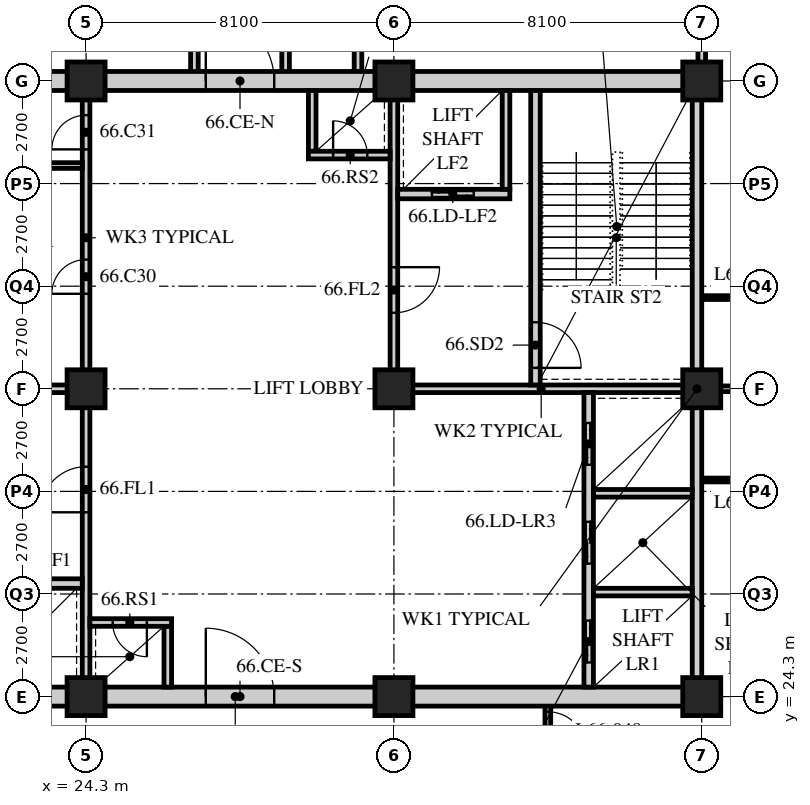
"""IFC4 building model, lengths in metres.
Left out: names, types, materials, properties, quantities, classifications, styles, units other than length and angle.
Written with IfcOpenShell. Run it as: python <this file> out.ifc"""

import sys

from ifc_helpers import new_model, si_unit, direction, frame, frame_2d, origin, origin_2d, place, context, subcontext, project, spatial, rectangle, hollow_rectangle, extrude, element, fill, save


model = new_model("IFC4")
c1 = context("Model", 3, precision=1e-05, world=origin(), true_north=direction((0.0, 1.0)))
c2 = subcontext(c1, "Body", "Model", "MODEL_VIEW")
j1 = project(units=[si_unit("LENGTHUNIT", "METRE"), si_unit("PLANEANGLEUNIT", "RADIAN")], contexts=[c1])
p1 = place(None, origin())
s1 = spatial("IfcSite", under=j1, at=p1, CompositionType="ELEMENT")
p2 = place(p1, origin())
s2 = spatial("IfcBuilding", under=s1, at=p2, CompositionType="ELEMENT")
p3 = place(p2, frame((0.0, 0.0, 258.0)))
s3 = spatial("IfcBuildingStorey", under=s2, at=p3, CompositionType="ELEMENT", Elevation=258.0)
for number, where, z_axis, x_axis in (
    (1, (24.3, 24.3, 0.0), (0.0, 0.0, 1.0), (1.0, 0.0, 0.0)),
    (2, (24.3, 32.4, 0.0), (0.0, 0.0, 1.0), (1.0, 0.0, 0.0)),
    (3, (24.3, 40.5, 0.0), (0.0, 0.0, 1.0), (1.0, 0.0, 0.0)),
    (4, (32.4, 24.3, 0.0), (0.0, 0.0, 1.0), (1.0, 0.0, 0.0)),
    (5, (32.4, 32.4, 0.0), (0.0, 0.0, 1.0), (1.0, 0.0, 0.0)),
    (6, (32.4, 40.5, 0.0), (0.0, 0.0, 1.0), (1.0, 0.0, 0.0)),
    (7, (40.5, 24.3, 0.0), (0.0, 0.0, 1.0), (1.0, 0.0, 0.0)),
    (8, (40.5, 32.4, 0.0), (0.0, 0.0, 1.0), (1.0, 0.0, 0.0)),
    (9, (40.5, 40.5, 0.0), (0.0, 0.0, 1.0), (1.0, 0.0, 0.0)),
):
    element("IfcColumn", number, at=place(p3, frame(where, z_axis=z_axis, x_axis=x_axis)), inside=s3, PredefinedType="COLUMN", context=c2, shape_type="SweptSolid", body=[
        extrude(hollow_rectangle(XDim=1.0, YDim=1.0, WallThickness=0.1, at=origin_2d()), origin(), (0.0, 0.0, 1.0), 3.9),
    ])
for number, where, z_axis, x_axis in (
    (10, (31.455, 46.8, 0.0), (0.0, 0.0, 1.0), (0.0, -1.0, 0.0)),
    (11, (27.15, 40.5, 0.0), (0.0, 0.0, 1.0), (0.0, 1.0, 0.0)),
    (12, (29.55, 40.5, 0.0), (0.0, 0.0, 1.0), (0.0, 1.0, 0.0)),
):
    element("IfcWall", number, at=place(p3, frame(where, z_axis=z_axis, x_axis=x_axis)), inside=s3, PredefinedType="SOLIDWALL", context=c2, shape_type="SweptSolid", body=[
        extrude(rectangle(XDim=6.3, YDim=0.2, at=frame_2d((3.15, 0.0))), origin(), (0.0, 0.0, 1.0), 3.69),
    ])
p4 = place(p3, frame((36.45, 22.5, 0.0), z_axis=(0.0, 0.0, 1.0), x_axis=(0.0, 1.0, 0.0)))
e13 = element("IfcWall", 13, at=p4, inside=s3, PredefinedType="PARTITIONING", context=c2, shape_type="SweptSolid", body=[
    extrude(rectangle(XDim=1.8, YDim=0.15, at=frame_2d((0.9, 0.0))), origin(), (0.0, 0.0, 1.0), 3.69),
])
p5 = place(p4, frame((0.4, 0.0, 0.0)))
e14 = element("IfcOpeningElement", 14, at=p5, cuts=e13, PredefinedType="OPENING", context=c2, shape_type="SweptSolid", body=[
    extrude(rectangle(XDim=1.0, YDim=2.1, at=frame_2d((0.5, 1.05))), frame((0.0, 0.085, 0.0), z_axis=(0.0, -1.0, 0.0), x_axis=(1.0, 0.0, 0.0)), (0.0, 0.0, 1.0), 0.17),
])
p6 = place(p3, frame((40.5, 40.5, 0.0), z_axis=(0.0, 0.0, 1.0), x_axis=(0.0, 1.0, 0.0)))
e15 = element("IfcWall", 15, at=p6, inside=s3, PredefinedType="SOLIDWALL", context=c2, shape_type="SweptSolid", body=[
    extrude(rectangle(XDim=6.3, YDim=0.2, at=frame_2d((3.15, 0.0))), origin(), (0.0, 0.0, 1.0), 3.078),
])
p7 = place(p3, frame((40.5, 30.0, 0.0), z_axis=(0.0, 0.0, 1.0), x_axis=(1.0, 0.0, 0.0)))
e16 = element("IfcWall", 16, at=p7, inside=s3, PredefinedType="PARTITIONING", context=c2, shape_type="SweptSolid", body=[
    extrude(rectangle(XDim=2.4, YDim=0.1, at=frame_2d((1.2, 0.0))), origin(), (0.0, 0.0, 1.0), 3.69),
])
p8 = place(p7, frame((0.8, 0.0, 0.0)))
e17 = element("IfcOpeningElement", 17, at=p8, cuts=e16, PredefinedType="OPENING", context=c2, shape_type="SweptSolid", body=[
    extrude(rectangle(XDim=0.8, YDim=2.1, at=frame_2d((0.4, 1.05))), frame((0.0, 0.06, 0.0), z_axis=(0.0, -1.0, 0.0), x_axis=(1.0, 0.0, 0.0)), (0.0, 0.0, 1.0), 0.12),
])
p9 = place(p3, frame((40.5, 32.4, 0.0), z_axis=(0.0, 0.0, 1.0), x_axis=(1.0, 0.0, 0.0)))
e18 = element("IfcWall", 18, at=p9, inside=s3, PredefinedType="PARTITIONING", context=c2, shape_type="SweptSolid", body=[
    extrude(rectangle(XDim=15.9, YDim=0.15, at=frame_2d((7.95, 0.0))), origin(), (0.0, 0.0, 1.0), 3.078),
])
p10 = place(p3, frame((40.5, 34.8, 0.0), z_axis=(0.0, 0.0, 1.0), x_axis=(1.0, 0.0, 0.0)))
e19 = element("IfcWall", 19, at=p10, inside=s3, PredefinedType="PARTITIONING", context=c2, shape_type="SweptSolid", body=[
    extrude(rectangle(XDim=2.4, YDim=0.1, at=frame_2d((1.2, 0.0))), origin(), (0.0, 0.0, 1.0), 3.69),
])
p11 = place(p10, frame((0.8, 0.0, 0.0)))
e20 = element("IfcOpeningElement", 20, at=p11, cuts=e19, PredefinedType="OPENING", context=c2, shape_type="SweptSolid", body=[
    extrude(rectangle(XDim=0.8, YDim=2.1, at=frame_2d((0.4, 1.05))), frame((0.0, 0.06, 0.0), z_axis=(0.0, -1.0, 0.0), x_axis=(1.0, 0.0, 0.0)), (0.0, 0.0, 1.0), 0.12),
])
p12 = place(p3, frame((15.95, 24.3, 0.0), z_axis=(0.0, 0.0, 1.0), x_axis=(1.0, 0.0, 0.0)))
e21 = element("IfcWall", 21, at=p12, inside=s3, PredefinedType="SOLIDWALL", context=c2, shape_type="SweptSolid", body=[
    extrude(rectangle(XDim=24.55, YDim=0.5, at=frame_2d((12.275, 0.0))), origin(), (0.0, 0.0, 1.0), 3.04),
])
p13 = place(p12, frame((11.5, 0.0, 0.0)))
e22 = element("IfcOpeningElement", 22, at=p13, cuts=e21, PredefinedType="OPENING", context=c2, shape_type="SweptSolid", body=[
    extrude(rectangle(XDim=1.8, YDim=2.4, at=frame_2d((0.9, 1.2))), frame((0.0, 0.26, 0.0), z_axis=(0.0, -1.0, 0.0), x_axis=(1.0, 0.0, 0.0)), (0.0, 0.0, 1.0), 0.52),
])
p14 = place(p3, frame((15.95, 40.5, 0.0), z_axis=(0.0, 0.0, 1.0), x_axis=(1.0, 0.0, 0.0)))
e23 = element("IfcWall", 23, at=p14, inside=s3, PredefinedType="SOLIDWALL", context=c2, shape_type="SweptSolid", body=[
    extrude(rectangle(XDim=24.55, YDim=0.5, at=frame_2d((12.275, 0.0))), origin(), (0.0, 0.0, 1.0), 3.04),
])
p15 = place(p14, frame((11.5, 0.0, 0.0)))
e24 = element("IfcOpeningElement", 24, at=p15, cuts=e23, PredefinedType="OPENING", context=c2, shape_type="SweptSolid", body=[
    extrude(rectangle(XDim=1.8, YDim=2.4, at=frame_2d((0.9, 1.2))), frame((0.0, 0.26, 0.0), z_axis=(0.0, -1.0, 0.0), x_axis=(1.0, 0.0, 0.0)), (0.0, 0.0, 1.0), 0.52),
])
p16 = place(p3, frame((40.375, 24.55, 0.0), z_axis=(0.0, 0.0, 1.0), x_axis=(0.0, 1.0, 0.0)))
e25 = element("IfcWall", 25, at=p16, inside=s3, PredefinedType="SOLIDWALL", context=c2, shape_type="SweptSolid", body=[
    extrude(rectangle(XDim=15.7, YDim=0.25, at=frame_2d((7.85, 0.0))), origin(), (0.0, 0.0, 1.0), 3.078),
])
p17 = place(p3, frame((16.45, 32.4, 0.0), z_axis=(0.0, 0.0, 1.0), x_axis=(1.0, 0.0, 0.0)))
e26 = element("IfcWall", 26, at=p17, inside=s3, PredefinedType="SOLIDWALL", context=c2, shape_type="SweptSolid", body=[
    extrude(rectangle(XDim=7.95, YDim=0.2, at=frame_2d((3.975, 0.0))), origin(), (0.0, 0.0, 1.0), 3.078),
])
p18 = place(p3, frame((24.3, 24.55, 0.0), z_axis=(0.0, 0.0, 1.0), x_axis=(0.0, 1.0, 0.0)))
e27 = element("IfcWall", 27, at=p18, inside=s3, PredefinedType="SOLIDWALL", context=c2, shape_type="SweptSolid", body=[
    extrude(rectangle(XDim=7.75, YDim=0.2, at=frame_2d((3.875, 0.0))), origin(), (0.0, 0.0, 1.0), 3.078),
])
p19 = place(p18, frame((4.6, 0.0, 0.0)))
e28 = element("IfcOpeningElement", 28, at=p19, cuts=e27, PredefinedType="OPENING", context=c2, shape_type="SweptSolid", body=[
    extrude(rectangle(XDim=1.2, YDim=2.1, at=frame_2d((0.6, 1.05))), frame((0.0, 0.11, 0.0), z_axis=(0.0, -1.0, 0.0), x_axis=(1.0, 0.0, 0.0)), (0.0, 0.0, 1.0), 0.22),
])
p20 = place(p3, frame((21.25, 27.275, 0.0), z_axis=(0.0, 0.0, 1.0), x_axis=(1.0, 0.0, 0.0)))
e29 = element("IfcWall", 29, at=p20, inside=s3, PredefinedType="SOLIDWALL", context=c2, shape_type="SweptSolid", body=[
    extrude(rectangle(XDim=2.95, YDim=0.25, at=frame_2d((1.475, 0.0))), origin(), (0.0, 0.0, 1.0), 3.69),
])
p21 = place(p20, frame((0.95, 0.0, 0.0)))
e30 = element("IfcOpeningElement", 30, at=p21, cuts=e29, PredefinedType="OPENING", context=c2, shape_type="SweptSolid", body=[
    extrude(rectangle(XDim=1.1, YDim=2.4, at=frame_2d((0.55, 1.2))), frame((0.0, 0.135, 0.0), z_axis=(0.0, -1.0, 0.0), x_axis=(1.0, 0.0, 0.0)), (0.0, 0.0, 1.0), 0.27),
])
p22 = place(p3, frame((26.45, 24.55, 0.0), z_axis=(0.0, 0.0, 1.0), x_axis=(0.0, 1.0, 0.0)))
e31 = element("IfcWall", 31, at=p22, inside=s3, PredefinedType="SOLIDWALL", context=c2, shape_type="SweptSolid", body=[
    extrude(rectangle(XDim=1.6, YDim=0.2, at=frame_2d((0.8, 0.0))), origin(), (0.0, 0.0, 1.0), 3.69),
])
p23 = place(p3, frame((24.4, 26.25, 0.0), z_axis=(0.0, 0.0, 1.0), x_axis=(1.0, 0.0, 0.0)))
e32 = element("IfcWall", 32, at=p23, inside=s3, PredefinedType="SOLIDWALL", context=c2, shape_type="SweptSolid", body=[
    extrude(rectangle(XDim=2.15, YDim=0.2, at=frame_2d((1.075, 0.0))), origin(), (0.0, 0.0, 1.0), 3.69),
])
p24 = place(p23, frame((0.6, 0.0, 0.0)))
e33 = element("IfcOpeningElement", 33, at=p24, cuts=e32, PredefinedType="OPENING", context=c2, shape_type="SweptSolid", body=[
    extrude(rectangle(XDim=0.9, YDim=2.1, at=frame_2d((0.45, 1.05))), frame((0.0, 0.11, 0.0), z_axis=(0.0, -1.0, 0.0), x_axis=(1.0, 0.0, 0.0)), (0.0, 0.0, 1.0), 0.22),
])
p25 = place(p3, frame((32.3, 32.4, 0.0), z_axis=(0.0, 0.0, 1.0), x_axis=(1.0, 0.0, 0.0)))
e34 = element("IfcWall", 34, at=p25, inside=s3, PredefinedType="SOLIDWALL", context=c2, shape_type="SweptSolid", body=[
    extrude(rectangle(XDim=7.95, YDim=0.2, at=frame_2d((3.975, 0.0))), origin(), (0.0, 0.0, 1.0), 3.078),
])
p26 = place(p3, frame((32.4, 32.5, 0.0), z_axis=(0.0, 0.0, 1.0), x_axis=(0.0, 1.0, 0.0)))
e35 = element("IfcWall", 35, at=p26, inside=s3, PredefinedType="SOLIDWALL", context=c2, shape_type="SweptSolid", body=[
    extrude(rectangle(XDim=7.75, YDim=0.2, at=frame_2d((3.875, 0.0))), origin(), (0.0, 0.0, 1.0), 3.078),
])
p27 = place(p26, frame((1.9, 0.0, 0.0)))
e36 = element("IfcOpeningElement", 36, at=p27, cuts=e35, PredefinedType="OPENING", context=c2, shape_type="SweptSolid", body=[
    extrude(rectangle(XDim=1.2, YDim=2.1, at=frame_2d((0.6, 1.05))), frame((0.0, 0.11, 0.0), z_axis=(0.0, -1.0, 0.0), x_axis=(1.0, 0.0, 0.0)), (0.0, 0.0, 1.0), 0.22),
])
p28 = place(p3, frame((37.525, 24.55, 0.0), z_axis=(0.0, 0.0, 1.0), x_axis=(0.0, 1.0, 0.0)))
e37 = element("IfcWall", 37, at=p28, inside=s3, PredefinedType="SOLIDWALL", context=c2, shape_type="SweptSolid", body=[
    extrude(rectangle(XDim=7.75, YDim=0.25, at=frame_2d((3.875, 0.0))), origin(), (0.0, 0.0, 1.0), 3.69),
])
p29 = place(p28, frame((0.65, 0.0, 0.0)))
e38 = element("IfcOpeningElement", 38, at=p29, cuts=e37, PredefinedType="OPENING", context=c2, shape_type="SweptSolid", body=[
    extrude(rectangle(XDim=1.1, YDim=2.4, at=frame_2d((0.55, 1.2))), frame((0.0, 0.135, 0.0), z_axis=(0.0, -1.0, 0.0), x_axis=(1.0, 0.0, 0.0)), (0.0, 0.0, 1.0), 0.27),
])
p30 = place(p28, frame((3.25, 0.0, 0.0)))
e39 = element("IfcOpeningElement", 39, at=p30, cuts=e37, PredefinedType="OPENING", context=c2, shape_type="SweptSolid", body=[
    extrude(rectangle(XDim=1.1, YDim=2.4, at=frame_2d((0.55, 1.2))), frame((0.0, 0.135, 0.0), z_axis=(0.0, -1.0, 0.0), x_axis=(1.0, 0.0, 0.0)), (0.0, 0.0, 1.0), 0.27),
])
p31 = place(p28, frame((5.85, 0.0, 0.0)))
e40 = element("IfcOpeningElement", 40, at=p31, cuts=e37, PredefinedType="OPENING", context=c2, shape_type="SweptSolid", body=[
    extrude(rectangle(XDim=1.1, YDim=2.4, at=frame_2d((0.55, 1.2))), frame((0.0, 0.135, 0.0), z_axis=(0.0, -1.0, 0.0), x_axis=(1.0, 0.0, 0.0)), (0.0, 0.0, 1.0), 0.27),
])
for number, where, z_axis, x_axis in (
    (41, (37.65, 27.05, 0.0), (0.0, 0.0, 1.0), (1.0, 0.0, 0.0)),
    (42, (37.65, 29.65, 0.0), (0.0, 0.0, 1.0), (1.0, 0.0, 0.0)),
):
    element("IfcWall", number, at=place(p3, frame(where, z_axis=z_axis, x_axis=x_axis)), inside=s3, PredefinedType="SOLIDWALL", context=c2, shape_type="SweptSolid", body=[
        extrude(rectangle(XDim=2.6, YDim=0.2, at=frame_2d((1.3, 0.0))), origin(), (0.0, 0.0, 1.0), 3.69),
    ])
p32 = place(p3, frame((36.125, 32.5, 0.0), z_axis=(0.0, 0.0, 1.0), x_axis=(0.0, 1.0, 0.0)))
e43 = element("IfcWall", 43, at=p32, inside=s3, PredefinedType="SOLIDWALL", context=c2, shape_type="SweptSolid", body=[
    extrude(rectangle(XDim=7.75, YDim=0.25, at=frame_2d((3.875, 0.0))), origin(), (0.0, 0.0, 1.0), 3.69),
])
p33 = place(p32, frame((0.45, 0.0, 0.0)))
e44 = element("IfcOpeningElement", 44, at=p33, cuts=e43, PredefinedType="OPENING", context=c2, shape_type="SweptSolid", body=[
    extrude(rectangle(XDim=1.2, YDim=2.1, at=frame_2d((0.6, 1.05))), frame((0.0, 0.135, 0.0), z_axis=(0.0, -1.0, 0.0), x_axis=(1.0, 0.0, 0.0)), (0.0, 0.0, 1.0), 0.27),
])
p34 = place(p3, frame((32.5, 37.525, 0.0), z_axis=(0.0, 0.0, 1.0), x_axis=(1.0, 0.0, 0.0)))
e45 = element("IfcWall", 45, at=p34, inside=s3, PredefinedType="SOLIDWALL", context=c2, shape_type="SweptSolid", body=[
    extrude(rectangle(XDim=2.95, YDim=0.25, at=frame_2d((1.475, 0.0))), origin(), (0.0, 0.0, 1.0), 3.69),
])
p35 = place(p34, frame((0.9, 0.0, 0.0)))
e46 = element("IfcOpeningElement", 46, at=p35, cuts=e45, PredefinedType="OPENING", context=c2, shape_type="SweptSolid", body=[
    extrude(rectangle(XDim=1.1, YDim=2.4, at=frame_2d((0.55, 1.2))), frame((0.0, 0.135, 0.0), z_axis=(0.0, -1.0, 0.0), x_axis=(1.0, 0.0, 0.0)), (0.0, 0.0, 1.0), 0.27),
])
p36 = place(p3, frame((35.35, 37.65, 0.0), z_axis=(0.0, 0.0, 1.0), x_axis=(0.0, 1.0, 0.0)))
e47 = element("IfcWall", 47, at=p36, inside=s3, PredefinedType="SOLIDWALL", context=c2, shape_type="SweptSolid", body=[
    extrude(rectangle(XDim=2.6, YDim=0.2, at=frame_2d((1.3, 0.0))), origin(), (0.0, 0.0, 1.0), 3.69),
])
p37 = place(p3, frame((30.25, 38.65, 0.0), z_axis=(0.0, 0.0, 1.0), x_axis=(0.0, 1.0, 0.0)))
e48 = element("IfcWall", 48, at=p37, inside=s3, PredefinedType="SOLIDWALL", context=c2, shape_type="SweptSolid", body=[
    extrude(rectangle(XDim=1.6, YDim=0.2, at=frame_2d((0.8, 0.0))), origin(), (0.0, 0.0, 1.0), 3.69),
])
p38 = place(p3, frame((30.15, 38.55, 0.0), z_axis=(0.0, 0.0, 1.0), x_axis=(1.0, 0.0, 0.0)))
e49 = element("IfcWall", 49, at=p38, inside=s3, PredefinedType="SOLIDWALL", context=c2, shape_type="SweptSolid", body=[
    extrude(rectangle(XDim=2.15, YDim=0.2, at=frame_2d((1.075, 0.0))), origin(), (0.0, 0.0, 1.0), 3.69),
])
p39 = place(p38, frame((0.65, 0.0, 0.0)))
e50 = element("IfcOpeningElement", 50, at=p39, cuts=e49, PredefinedType="OPENING", context=c2, shape_type="SweptSolid", body=[
    extrude(rectangle(XDim=0.9, YDim=2.1, at=frame_2d((0.45, 1.05))), frame((0.0, 0.11, 0.0), z_axis=(0.0, -1.0, 0.0), x_axis=(1.0, 0.0, 0.0)), (0.0, 0.0, 1.0), 0.22),
])
p40 = place(p3, frame((24.3, 32.5, 0.0), z_axis=(0.0, 0.0, 1.0), x_axis=(0.0, 1.0, 0.0)))
e51 = element("IfcWall", 51, at=p40, inside=s3, PredefinedType="PARTITIONING", context=c2, shape_type="SweptSolid", body=[
    extrude(rectangle(XDim=7.75, YDim=0.2, at=frame_2d((3.875, 0.0))), origin(), (0.0, 0.0, 1.0), 3.078),
])
p41 = place(p40, frame((2.4, 0.0, 0.0)))
e52 = element("IfcOpeningElement", 52, at=p41, cuts=e51, PredefinedType="OPENING", context=c2, shape_type="SweptSolid", body=[
    extrude(rectangle(XDim=0.9, YDim=2.1, at=frame_2d((0.45, 1.05))), frame((0.0, 0.11, 0.0), z_axis=(0.0, -1.0, 0.0), x_axis=(1.0, 0.0, 0.0)), (0.0, 0.0, 1.0), 0.22),
])
p42 = place(p40, frame((6.2, 0.0, 0.0)))
e53 = element("IfcOpeningElement", 53, at=p42, cuts=e51, PredefinedType="OPENING", context=c2, shape_type="SweptSolid", body=[
    extrude(rectangle(XDim=0.9, YDim=2.1, at=frame_2d((0.45, 1.05))), frame((0.0, 0.11, 0.0), z_axis=(0.0, -1.0, 0.0), x_axis=(1.0, 0.0, 0.0)), (0.0, 0.0, 1.0), 0.22),
])
p43 = place(p3, frame((16.45, 38.275, 0.0), z_axis=(0.0, 0.0, 1.0), x_axis=(1.0, 0.0, 0.0)))
e54 = element("IfcWall", 54, at=p43, inside=s3, PredefinedType="PARTITIONING", context=c2, shape_type="SweptSolid", body=[
    extrude(rectangle(XDim=7.75, YDim=0.15, at=frame_2d((3.875, 0.0))), origin(), (0.0, 0.0, 1.0), 3.69),
])
p44 = place(p5, origin())
e55 = element("IfcDoor", 55, at=p44, inside=s3, OperationType="SINGLE_SWING_RIGHT", PredefinedType="DOOR", context=c2, shape_type="SweptSolid", body=[
    extrude(rectangle(XDim=1.0, YDim=2.1, at=frame_2d((0.5, 1.05))), frame((0.0, 0.025, 0.0), z_axis=(0.0, -1.0, 0.0), x_axis=(1.0, 0.0, 0.0)), (0.0, 0.0, 1.0), 0.05),
])
fill(e14, e55)
p45 = place(p41, origin())
e56 = element("IfcDoor", 56, at=p45, inside=s3, OperationType="SINGLE_SWING_LEFT", PredefinedType="DOOR", context=c2, shape_type="SweptSolid", body=[
    extrude(rectangle(XDim=0.9, YDim=2.1, at=frame_2d((0.45, 1.05))), frame((0.0, 0.025, 0.0), z_axis=(0.0, -1.0, 0.0), x_axis=(1.0, 0.0, 0.0)), (0.0, 0.0, 1.0), 0.05),
])
fill(e52, e56)
p46 = place(p42, origin())
e57 = element("IfcDoor", 57, at=p46, inside=s3, OperationType="SINGLE_SWING_LEFT", PredefinedType="DOOR", context=c2, shape_type="SweptSolid", body=[
    extrude(rectangle(XDim=0.9, YDim=2.1, at=frame_2d((0.45, 1.05))), frame((0.0, 0.025, 0.0), z_axis=(0.0, -1.0, 0.0), x_axis=(1.0, 0.0, 0.0)), (0.0, 0.0, 1.0), 0.05),
])
fill(e53, e57)
p47 = place(p19, origin())
e58 = element("IfcDoor", 58, at=p47, inside=s3, OperationType="SINGLE_SWING_LEFT", PredefinedType="DOOR", context=c2, shape_type="SweptSolid", body=[
    extrude(rectangle(XDim=1.2, YDim=2.1, at=frame_2d((0.6, 1.05))), frame((0.0, 0.025, 0.0), z_axis=(0.0, -1.0, 0.0), x_axis=(1.0, 0.0, 0.0)), (0.0, 0.0, 1.0), 0.05),
])
fill(e28, e58)
p48 = place(p24, origin())
e59 = element("IfcDoor", 59, at=p48, inside=s3, OperationType="SINGLE_SWING_LEFT", PredefinedType="DOOR", context=c2, shape_type="SweptSolid", body=[
    extrude(rectangle(XDim=0.9, YDim=2.1, at=frame_2d((0.45, 1.05))), frame((0.0, 0.025, 0.0), z_axis=(0.0, -1.0, 0.0), x_axis=(1.0, 0.0, 0.0)), (0.0, 0.0, 1.0), 0.05),
])
fill(e33, e59)
p49 = place(p33, origin())
e60 = element("IfcDoor", 60, at=p49, inside=s3, OperationType="SINGLE_SWING_RIGHT", PredefinedType="DOOR", context=c2, shape_type="SweptSolid", body=[
    extrude(rectangle(XDim=1.2, YDim=2.1, at=frame_2d((0.6, 1.05))), frame((0.0, 0.025, 0.0), z_axis=(0.0, -1.0, 0.0), x_axis=(1.0, 0.0, 0.0)), (0.0, 0.0, 1.0), 0.05),
])
fill(e44, e60)
p50 = place(p27, origin())
e61 = element("IfcDoor", 61, at=p50, inside=s3, OperationType="SINGLE_SWING_LEFT", PredefinedType="DOOR", context=c2, shape_type="SweptSolid", body=[
    extrude(rectangle(XDim=1.2, YDim=2.1, at=frame_2d((0.6, 1.05))), frame((0.0, 0.025, 0.0), z_axis=(0.0, -1.0, 0.0), x_axis=(1.0, 0.0, 0.0)), (0.0, 0.0, 1.0), 0.05),
])
fill(e36, e61)
p51 = place(p39, origin())
e62 = element("IfcDoor", 62, at=p51, inside=s3, OperationType="SINGLE_SWING_LEFT", PredefinedType="DOOR", context=c2, shape_type="SweptSolid", body=[
    extrude(rectangle(XDim=0.9, YDim=2.1, at=frame_2d((0.45, 1.05))), frame((0.0, 0.025, 0.0), z_axis=(0.0, -1.0, 0.0), x_axis=(1.0, 0.0, 0.0)), (0.0, 0.0, 1.0), 0.05),
])
fill(e50, e62)
p52 = place(p29, origin())
e63 = element("IfcDoor", 63, at=p52, inside=s3, OperationType="DOUBLE_DOOR_SLIDING", PredefinedType="DOOR", context=c2, shape_type="SweptSolid", body=[
    extrude(rectangle(XDim=1.1, YDim=2.4, at=frame_2d((0.55, 1.2))), frame((0.0, 0.025, 0.0), z_axis=(0.0, -1.0, 0.0), x_axis=(1.0, 0.0, 0.0)), (0.0, 0.0, 1.0), 0.05),
])
fill(e38, e63)
p53 = place(p30, origin())
e64 = element("IfcDoor", 64, at=p53, inside=s3, OperationType="DOUBLE_DOOR_SLIDING", PredefinedType="DOOR", context=c2, shape_type="SweptSolid", body=[
    extrude(rectangle(XDim=1.1, YDim=2.4, at=frame_2d((0.55, 1.2))), frame((0.0, 0.025, 0.0), z_axis=(0.0, -1.0, 0.0), x_axis=(1.0, 0.0, 0.0)), (0.0, 0.0, 1.0), 0.05),
])
fill(e39, e64)
p54 = place(p31, origin())
e65 = element("IfcDoor", 65, at=p54, inside=s3, OperationType="DOUBLE_DOOR_SLIDING", PredefinedType="DOOR", context=c2, shape_type="SweptSolid", body=[
    extrude(rectangle(XDim=1.1, YDim=2.4, at=frame_2d((0.55, 1.2))), frame((0.0, 0.025, 0.0), z_axis=(0.0, -1.0, 0.0), x_axis=(1.0, 0.0, 0.0)), (0.0, 0.0, 1.0), 0.05),
])
fill(e40, e65)
p55 = place(p35, origin())
e66 = element("IfcDoor", 66, at=p55, inside=s3, OperationType="DOUBLE_DOOR_SLIDING", PredefinedType="DOOR", context=c2, shape_type="SweptSolid", body=[
    extrude(rectangle(XDim=1.1, YDim=2.4, at=frame_2d((0.55, 1.2))), frame((0.0, 0.025, 0.0), z_axis=(0.0, -1.0, 0.0), x_axis=(1.0, 0.0, 0.0)), (0.0, 0.0, 1.0), 0.05),
])
fill(e46, e66)
p56 = place(p13, origin())
e67 = element("IfcDoor", 67, at=p56, inside=s3, OperationType="DOUBLE_DOOR_SINGLE_SWING", PredefinedType="DOOR", context=c2, shape_type="SweptSolid", body=[
    extrude(rectangle(XDim=1.8, YDim=2.4, at=frame_2d((0.9, 1.2))), frame((0.0, 0.025, 0.0), z_axis=(0.0, -1.0, 0.0), x_axis=(1.0, 0.0, 0.0)), (0.0, 0.0, 1.0), 0.05),
])
fill(e22, e67)
p57 = place(p15, origin())
e68 = element("IfcDoor", 68, at=p57, inside=s3, OperationType="DOUBLE_DOOR_SINGLE_SWING", PredefinedType="DOOR", context=c2, shape_type="SweptSolid", body=[
    extrude(rectangle(XDim=1.8, YDim=2.4, at=frame_2d((0.9, 1.2))), frame((0.0, 0.025, 0.0), z_axis=(0.0, -1.0, 0.0), x_axis=(1.0, 0.0, 0.0)), (0.0, 0.0, 1.0), 0.05),
])
fill(e24, e68)
save(model, sys.argv[1])
